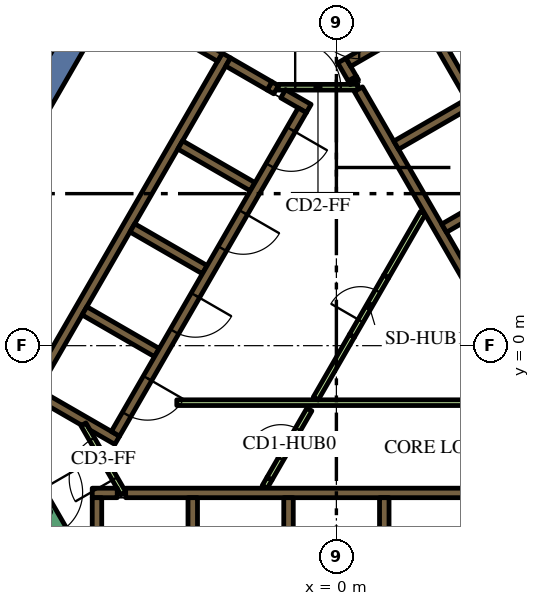
"""IFC4 building model, lengths in metres.
Left out: names, types, materials, properties, quantities, classifications, styles, units other than length and angle.
Written with IfcOpenShell. Run it as: python <this file> out.ifc"""

import sys

from ifc_helpers import new_model, si_unit, direction, frame, frame_2d, origin, place, context, subcontext, project, spatial, polyline, rectangle, outline, extrude, element, fill, save


model = new_model("IFC4")
c1 = context("Model", 3, precision=1e-05, world=origin(), true_north=direction((0.0, 1.0)))
c2 = subcontext(c1, "Body", "Model", "MODEL_VIEW")
j1 = project(units=[si_unit("LENGTHUNIT", "METRE"), si_unit("PLANEANGLEUNIT", "RADIAN")], contexts=[c1])
p1 = place(None, origin())
s1 = spatial("IfcSite", under=j1, at=p1, CompositionType="ELEMENT")
p2 = place(p1, origin())
s2 = spatial("IfcBuilding", under=s1, at=p2, CompositionType="ELEMENT")
p3 = place(p2, frame((0.0, 0.0, 247.8)))
s3 = spatial("IfcBuildingStorey", under=s2, at=p3, CompositionType="ELEMENT", Elevation=247.8)
p4 = place(p3, frame((8.235, 5.736, 0.0), z_axis=(0.0, 0.0, 1.0), x_axis=(-0.499983401189, 0.8660349869, 0.0)))
e1 = element("IfcWall", 1, at=p4, inside=s3, PredefinedType="SOLIDWALL", context=c2, shape_type="SweptSolid", body=[
    extrude(rectangle(XDim=12.472, YDim=0.7, at=frame_2d((6.236, 0.0))), origin(), (0.0, 0.0, 1.0), 4.2),
])
p5 = place(p3, frame((-12.625, -1.867, 0.0), z_axis=(0.0, 0.0, 1.0), x_axis=(0.499996974394, 0.866027150612, 0.0)))
e2 = element("IfcWall", 2, at=p5, inside=s3, PredefinedType="SOLIDWALL", context=c2, shape_type="SweptSolid", body=[
    extrude(rectangle(XDim=15.858, YDim=0.7, at=frame_2d((7.929, 0.0))), origin(), (0.0, 0.0, 1.0), 4.2),
])
p6 = place(p3, frame((-5.545, -3.875, 0.0), z_axis=(0.0, 0.0, 1.0), x_axis=(1.0, 0.0, 0.0)))
e3 = element("IfcWall", 3, at=p6, inside=s3, PredefinedType="SOLIDWALL", context=c2, shape_type="SweptSolid", body=[
    extrude(rectangle(XDim=11.97, YDim=0.25, at=frame_2d((5.985, 0.0))), origin(), (0.0, 0.0, 1.0), 4.2),
])
p7 = place(p3, frame((-6.425, -3.875, 0.0), z_axis=(0.0, 0.0, 1.0), x_axis=(1.0, 0.0, 0.0)))
e4 = element("IfcWall", 4, at=p7, inside=s3, PredefinedType="SOLIDWALL", context=c2, shape_type="SweptSolid", body=[
    extrude(rectangle(XDim=0.658, YDim=0.25, at=frame_2d((0.329, 0.0))), origin(), (0.0, 0.0, 1.0), 4.2),
])
for number, where, z_axis, x_axis in (
    (5, (1.26, -4.0, 0.0), (0.0, 0.0, 1.0), (0.0, -1.0, 0.0)),
    (6, (-1.26, -4.0, 0.0), (0.0, 0.0, 1.0), (0.0, -1.0, 0.0)),
    (7, (-3.78, -4.0, 0.0), (0.0, 0.0, 1.0), (0.0, -1.0, 0.0)),
):
    element("IfcWall", number, at=place(p3, frame(where, z_axis=z_axis, x_axis=x_axis)), inside=s3, PredefinedType="SOLIDWALL", context=c2, shape_type="SweptSolid", body=[
        extrude(rectangle(XDim=2.2, YDim=0.25, at=frame_2d((1.1, 0.0))), origin(), (0.0, 0.0, 1.0), 4.2),
    ])
p8 = place(p3, frame((-6.3, -7.125, 0.0), z_axis=(0.0, 0.0, 1.0), x_axis=(0.0, 1.0, 0.0)))
e8 = element("IfcWall", 8, at=p8, inside=s3, PredefinedType="SOLIDWALL", context=c2, shape_type="SweptSolid", body=[
    extrude(rectangle(XDim=3.125, YDim=0.25, at=frame_2d((1.562, 0.0))), origin(), (0.0, 0.0, 1.0), 4.2),
])
p9 = place(p3, frame((0.473, 6.93, 0.0), z_axis=(0.0, 0.0, 1.0), x_axis=(-0.49972245349, 0.866185586049, 0.0)))
e9 = element("IfcWall", 9, at=p9, inside=s3, PredefinedType="SOLIDWALL", context=c2, shape_type="SweptSolid", body=[
    extrude(rectangle(XDim=0.11, YDim=0.25, at=frame_2d((0.055, 0.0))), origin(), (0.0, 0.0, 1.0), 4.2),
])
p10 = place(p3, frame((6.568, -3.627, 0.0), z_axis=(0.0, 0.0, 1.0), x_axis=(-0.499999455981, 0.866025717874, 0.0)))
e10 = element("IfcWall", 10, at=p10, inside=s3, PredefinedType="SOLIDWALL", context=c2, shape_type="SweptSolid", body=[
    extrude(rectangle(XDim=11.978, YDim=0.25, at=frame_2d((5.989, 0.0))), origin(), (0.0, 0.0, 1.0), 4.2),
])
p11 = place(p3, frame((0.417, 7.027, 0.0), z_axis=(0.0, 0.0, 1.0), x_axis=(-0.500210807569, 0.865903659763, 0.0)))
e11 = element("IfcWall", 11, at=p11, inside=s3, PredefinedType="SOLIDWALL", context=c2, shape_type="SweptSolid", body=[
    extrude(rectangle(XDim=0.548, YDim=0.25, at=frame_2d((0.274, 0.0))), origin(), (0.0, 0.0, 1.0), 4.2),
])
p12 = place(p3, frame((3.1, 9.064, 0.0), z_axis=(0.0, 0.0, 1.0), x_axis=(-0.866030133475, -0.499991807846, 0.0)))
e12 = element("IfcWall", 12, at=p12, inside=s3, PredefinedType="SOLIDWALL", context=c2, shape_type="SweptSolid", body=[
    extrude(rectangle(XDim=3.217, YDim=0.25, at=frame_2d((1.608, 0.0))), origin(), (0.0, 0.0, 1.0), 4.2),
])
p13 = place(p3, frame((1.574, 5.274, 0.0), z_axis=(0.0, 0.0, 1.0), x_axis=(0.866028486751, 0.499994660107, 0.0)))
e13 = element("IfcWall", 13, at=p13, inside=s3, PredefinedType="SOLIDWALL", context=c2, shape_type="SweptSolid", body=[
    extrude(rectangle(XDim=2.2, YDim=0.25, at=frame_2d((1.1, 0.0))), origin(), (0.0, 0.0, 1.0), 4.2),
])
p14 = place(p3, frame((2.834, 3.091, 0.0), z_axis=(0.0, 0.0, 1.0), x_axis=(0.866008176907, 0.50002983664, 0.0)))
e14 = element("IfcWall", 14, at=p14, inside=s3, PredefinedType="SOLIDWALL", context=c2, shape_type="SweptSolid", body=[
    extrude(rectangle(XDim=2.2, YDim=0.25, at=frame_2d((1.1, 0.0))), origin(), (0.0, 0.0, 1.0), 4.2),
])
p15 = place(p3, frame((-8.06, -1.311, 0.0), z_axis=(0.0, 0.0, 1.0), x_axis=(0.50000273126, 0.866023826885, 0.0)))
e15 = element("IfcWall", 15, at=p15, inside=s3, PredefinedType="SOLIDWALL", context=c2, shape_type="SweptSolid", body=[
    extrude(rectangle(XDim=10.33, YDim=0.25, at=frame_2d((5.165, 0.0))), origin(), (0.0, 0.0, 1.0), 4.2),
])
p16 = place(p3, frame((-1.758, 6.835, 0.0), z_axis=(0.0, 0.0, 1.0), x_axis=(0.865982457891, -0.500074377092, 0.0)))
e16 = element("IfcWall", 16, at=p16, inside=s3, PredefinedType="SOLIDWALL", context=c2, shape_type="SweptSolid", body=[
    extrude(rectangle(XDim=0.2, YDim=0.25, at=frame_2d((0.1, 0.0))), origin(), (0.0, 0.0, 1.0), 4.2),
])
p17 = place(p3, frame((-1.76, 6.836, 0.0), z_axis=(0.0, 0.0, 1.0), x_axis=(-0.865952863304, 0.500125622755, 0.0)))
e17 = element("IfcWall", 17, at=p17, inside=s3, PredefinedType="SOLIDWALL", context=c2, shape_type="SweptSolid", body=[
    extrude(rectangle(XDim=1.258, YDim=0.25, at=frame_2d((0.629, 0.0))), origin(), (0.0, 0.0, 1.0), 4.2),
])
p18 = place(p3, frame((-0.728, 6.24, 0.0), z_axis=(0.0, 0.0, 1.0), x_axis=(-0.865955664968, 0.500120771724, 0.0)))
e18 = element("IfcWall", 18, at=p18, inside=s3, PredefinedType="SOLIDWALL", context=c2, shape_type="SweptSolid", body=[
    extrude(rectangle(XDim=0.778, YDim=0.25, at=frame_2d((0.389, 0.0))), origin(), (0.0, 0.0, 1.0), 4.2),
])
for number, where, z_axis, x_axis in (
    (19, (-2.204, 4.182, 0.0), (0.0, 0.0, 1.0), (-0.866, 0.5, 0.0)),
    (20, (-5.369, 3.1, 0.0), (0.0, 0.0, 1.0), (0.866, -0.5, 0.0)),
    (21, (-4.724, -0.182, 0.0), (0.0, 0.0, 1.0), (-0.866, 0.5, 0.0)),
):
    element("IfcWall", number, at=place(p3, frame(where, z_axis=z_axis, x_axis=x_axis)), inside=s3, PredefinedType="SOLIDWALL", context=c2, shape_type="SweptSolid", body=[
        extrude(rectangle(XDim=2.2, YDim=0.25, at=frame_2d((1.1, 0.0))), origin(), (0.0, 0.0, 1.0), 4.2),
    ])
p19 = place(p3, origin())
e22 = element("IfcWall", 22, at=p19, inside=s3, PredefinedType="SOLIDWALL", context=c2, shape_type="SweptSolid", body=[
    extrude(outline(polyline([(-5.922, -2.257), (-5.922, -2.257), (-5.705, -2.382), (-5.83, -2.598), (-6.483, -2.221), (-6.591, -2.033), (-6.591, -2.033), (-6.7, -2.096), (-7.952, -1.373), (-7.827, -1.156), (-5.922, -2.257)])), origin(), (0.0, 0.0, 1.0), 4.2),
])
p20 = place(p3, frame((-3.066, 7.59, 0.0), z_axis=(0.0, 0.0, 1.0), x_axis=(-0.866081358704, 0.49990307071, 0.0)))
e23 = element("IfcWall", 23, at=p20, inside=s3, PredefinedType="SOLIDWALL", context=c2, shape_type="SweptSolid", body=[
    extrude(rectangle(XDim=0.858, YDim=0.25, at=frame_2d((0.429, 0.0))), origin(), (0.0, 0.0, 1.0), 4.2),
])
p21 = place(p3, frame((-4.2, -1.5, 0.0), z_axis=(0.0, 0.0, 1.0), x_axis=(1.0, 0.0, 0.0)))
e24 = element("IfcWall", 24, at=p21, inside=s3, PredefinedType="PARTITIONING", context=c2, shape_type="SweptSolid", body=[
    extrude(rectangle(XDim=9.359, YDim=0.15, at=frame_2d((4.68, 0.0))), origin(), (0.0, 0.0, 1.0), 3.45),
])
p22 = place(p3, frame((-0.544, -1.393, 0.0), z_axis=(0.0, 0.0, 1.0), x_axis=(0.499928740635, 0.866066541489, 0.0)))
e25 = element("IfcWall", 25, at=p22, inside=s3, PredefinedType="PARTITIONING", context=c2, shape_type="SweptSolid", body=[
    extrude(rectangle(XDim=1.912, YDim=0.15, at=frame_2d((0.956, 0.0))), origin(), (0.0, 0.0, 1.0), 3.45),
])
p23 = place(p3, frame((1.312, 1.822, 0.0), z_axis=(0.0, 0.0, 1.0), x_axis=(0.500003549559, 0.866023354436, 0.0)))
e26 = element("IfcWall", 26, at=p23, inside=s3, PredefinedType="PARTITIONING", context=c2, shape_type="SweptSolid", body=[
    extrude(rectangle(XDim=1.93, YDim=0.15, at=frame_2d((0.965, 0.0))), origin(), (0.0, 0.0, 1.0), 3.45),
])
p24 = place(p3, frame((-1.887, -3.718, 0.0), z_axis=(0.0, 0.0, 1.0), x_axis=(0.500165633897, 0.865929753888, 0.0)))
e27 = element("IfcWall", 27, at=p24, inside=s3, PredefinedType="PARTITIONING", context=c2, shape_type="SweptSolid", body=[
    extrude(rectangle(XDim=0.254, YDim=0.15, at=frame_2d((0.127, 0.0))), origin(), (0.0, 0.0, 1.0), 3.45),
])
p25 = place(p3, frame((8.565, -2.185, 0.0), z_axis=(0.0, 0.0, 1.0), x_axis=(-0.499997954832, 0.866026584559, 0.0)))
e28 = element("IfcWall", 28, at=p25, inside=s3, PredefinedType="SOLIDWALL", context=c2, shape_type="SweptSolid", body=[
    extrude(rectangle(XDim=12.35, YDim=0.25, at=frame_2d((6.175, 0.0))), origin(), (0.0, 0.0, 1.0), 4.2),
])
p26 = place(p25, frame((0.585, 0.0, 0.0)))
e29 = element("IfcOpeningElement", 29, at=p26, cuts=e28, PredefinedType="OPENING", context=c2, shape_type="SweptSolid", body=[
    extrude(rectangle(XDim=1.1, YDim=2.1, at=frame_2d((0.55, 1.05))), frame((0.0, 0.135, 0.0), z_axis=(0.0, -1.0, 0.0), x_axis=(1.0, 0.0, 0.0)), (0.0, 0.0, 1.0), 0.27),
])
p27 = place(p3, frame((-0.898, 6.194, 0.0), z_axis=(0.0, 0.0, 1.0), x_axis=(-0.499996202215, -0.866027596426, 0.0)))
e30 = element("IfcWall", 30, at=p27, inside=s3, PredefinedType="SOLIDWALL", context=c2, shape_type="SweptSolid", body=[
    extrude(rectangle(XDim=9.83, YDim=0.25, at=frame_2d((4.915, 0.0))), origin(), (0.0, 0.0, 1.0), 4.2),
])
p28 = place(p27, frame((0.585, 0.0, 0.0)))
e31 = element("IfcOpeningElement", 31, at=p28, cuts=e30, PredefinedType="OPENING", context=c2, shape_type="SweptSolid", body=[
    extrude(rectangle(XDim=1.1, YDim=2.1, at=frame_2d((0.55, 1.05))), frame((0.0, 0.135, 0.0), z_axis=(0.0, -1.0, 0.0), x_axis=(1.0, 0.0, 0.0)), (0.0, 0.0, 1.0), 0.27),
])
p29 = place(p27, frame((3.105, 0.0, 0.0)))
e32 = element("IfcOpeningElement", 32, at=p29, cuts=e30, PredefinedType="OPENING", context=c2, shape_type="SweptSolid", body=[
    extrude(rectangle(XDim=1.1, YDim=2.1, at=frame_2d((0.55, 1.05))), frame((0.0, 0.135, 0.0), z_axis=(0.0, -1.0, 0.0), x_axis=(1.0, 0.0, 0.0)), (0.0, 0.0, 1.0), 0.27),
])
p30 = place(p27, frame((5.625, 0.0, 0.0)))
e33 = element("IfcOpeningElement", 33, at=p30, cuts=e30, PredefinedType="OPENING", context=c2, shape_type="SweptSolid", body=[
    extrude(rectangle(XDim=1.1, YDim=2.1, at=frame_2d((0.55, 1.05))), frame((0.0, 0.135, 0.0), z_axis=(0.0, -1.0, 0.0), x_axis=(1.0, 0.0, 0.0)), (0.0, 0.0, 1.0), 0.27),
])
p31 = place(p27, frame((8.145, 0.0, 0.0)))
e34 = element("IfcOpeningElement", 34, at=p31, cuts=e30, PredefinedType="OPENING", context=c2, shape_type="SweptSolid", body=[
    extrude(rectangle(XDim=1.1, YDim=2.1, at=frame_2d((0.55, 1.05))), frame((0.0, 0.135, 0.0), z_axis=(0.0, -1.0, 0.0), x_axis=(1.0, 0.0, 0.0)), (0.0, 0.0, 1.0), 0.27),
])
p32 = place(p3, frame((-8.103, -3.466, 0.0), z_axis=(0.0, 0.0, 1.0), x_axis=(0.500078061341, -0.865980330357, 0.0)))
e35 = element("IfcWall", 35, at=p32, inside=s3, PredefinedType="SOLIDWALL", context=c2, shape_type="SweptSolid", body=[
    extrude(rectangle(XDim=2.1, YDim=0.4, at=frame_2d((1.05, 0.0))), origin(), (0.0, 0.0, 1.0), 4.2),
])
p33 = place(p32, frame((0.45, 0.0, 0.0)))
e36 = element("IfcOpeningElement", 36, at=p33, cuts=e35, PredefinedType="OPENING", context=c2, shape_type="SweptSolid", body=[
    extrude(rectangle(XDim=1.2, YDim=2.1, at=frame_2d((0.6, 1.05))), frame((0.0, 0.21, 0.0), z_axis=(0.0, -1.0, 0.0), x_axis=(1.0, 0.0, 0.0)), (0.0, 0.0, 1.0), 0.42),
])
p34 = place(p3, frame((-1.76, -3.498, 0.0), z_axis=(0.0, 0.0, 1.0), x_axis=(0.499977374825, 0.866038466041, 0.0)))
e37 = element("IfcWall", 37, at=p34, inside=s3, PredefinedType="PARTITIONING", context=c2, shape_type="SweptSolid", body=[
    extrude(rectangle(XDim=2.1, YDim=0.15, at=frame_2d((1.05, 0.0))), origin(), (0.0, 0.0, 1.0), 3.45),
])
p35 = place(p34, frame((0.6, 0.0, 0.0)))
e38 = element("IfcOpeningElement", 38, at=p35, cuts=e37, PredefinedType="OPENING", context=c2, shape_type="SweptSolid", body=[
    extrude(rectangle(XDim=0.9, YDim=2.1, at=frame_2d((0.45, 1.05))), frame((0.0, 0.085, 0.0), z_axis=(0.0, -1.0, 0.0), x_axis=(1.0, 0.0, 0.0)), (0.0, 0.0, 1.0), 0.17),
])
p36 = place(p3, frame((-1.534, 6.8, 0.0), z_axis=(0.0, 0.0, 1.0), x_axis=(1.0, 0.0, 0.0)))
e39 = element("IfcWall", 39, at=p36, inside=s3, PredefinedType="PARTITIONING", context=c2, shape_type="SweptSolid", body=[
    extrude(rectangle(XDim=2.1, YDim=0.15, at=frame_2d((1.05, 0.0))), origin(), (0.0, 0.0, 1.0), 3.45),
])
p37 = place(p36, frame((0.45, 0.0, 0.0)))
e40 = element("IfcOpeningElement", 40, at=p37, cuts=e39, PredefinedType="OPENING", context=c2, shape_type="SweptSolid", body=[
    extrude(rectangle(XDim=1.2, YDim=2.1, at=frame_2d((0.6, 1.05))), frame((0.0, 0.085, 0.0), z_axis=(0.0, -1.0, 0.0), x_axis=(1.0, 0.0, 0.0)), (0.0, 0.0, 1.0), 0.17),
])
p38 = place(p3, frame((-5.606, -3.89, 0.0), z_axis=(0.0, 0.0, 1.0), x_axis=(-0.500027713859, 0.866009402589, 0.0)))
e41 = element("IfcWall", 41, at=p38, inside=s3, PredefinedType="PARTITIONING", context=c2, shape_type="SweptSolid", body=[
    extrude(rectangle(XDim=2.1, YDim=0.15, at=frame_2d((1.05, 0.0))), origin(), (0.0, 0.0, 1.0), 3.45),
])
p39 = place(p38, frame((0.45, 0.0, 0.0)))
e42 = element("IfcOpeningElement", 42, at=p39, cuts=e41, PredefinedType="OPENING", context=c2, shape_type="SweptSolid", body=[
    extrude(rectangle(XDim=1.2, YDim=2.1, at=frame_2d((0.6, 1.05))), frame((0.0, 0.085, 0.0), z_axis=(0.0, -1.0, 0.0), x_axis=(1.0, 0.0, 0.0)), (0.0, 0.0, 1.0), 0.17),
])
p40 = place(p3, frame((0.412, 0.263, 0.0), z_axis=(0.0, 0.0, 1.0), x_axis=(0.500062916607, 0.865989075817, 0.0)))
e43 = element("IfcWall", 43, at=p40, inside=s3, PredefinedType="PARTITIONING", context=c2, shape_type="SweptSolid", body=[
    extrude(rectangle(XDim=1.8, YDim=0.15, at=frame_2d((0.9, 0.0))), origin(), (0.0, 0.0, 1.0), 3.45),
])
p41 = place(p40, frame((0.45, 0.0, 0.0)))
e44 = element("IfcOpeningElement", 44, at=p41, cuts=e43, PredefinedType="OPENING", context=c2, shape_type="SweptSolid", body=[
    extrude(rectangle(XDim=0.9, YDim=2.1, at=frame_2d((0.45, 1.05))), frame((0.0, 0.085, 0.0), z_axis=(0.0, -1.0, 0.0), x_axis=(1.0, 0.0, 0.0)), (0.0, 0.0, 1.0), 0.17),
])
p42 = place(p3, frame((-7.364, 11.545, 0.0), z_axis=(0.0, 0.0, 1.0), x_axis=(-0.500001759768, -0.86602438778, 0.0)))
e45 = element("IfcWall", 45, at=p42, inside=s3, PredefinedType="PARTITIONING", context=c2, shape_type="SweptSolid", body=[
    extrude(rectangle(XDim=13.317, YDim=0.2, at=frame_2d((6.658, 0.0))), origin(), (0.0, 0.0, 1.0), 3.45),
])
p43 = place(p42, frame((6.2, 0.0, 0.0)))
e46 = element("IfcOpeningElement", 46, at=p43, cuts=e45, PredefinedType="OPENING", context=c2, shape_type="SweptSolid", body=[
    extrude(rectangle(XDim=1.0, YDim=2.1, at=frame_2d((0.5, 1.05))), frame((0.0, 0.11, 0.0), z_axis=(0.0, -1.0, 0.0), x_axis=(1.0, 0.0, 0.0)), (0.0, 0.0, 1.0), 0.22),
])
p44 = place(p28, origin())
e47 = element("IfcDoor", 47, at=p44, inside=s3, OperationType="DOUBLE_DOOR_SLIDING", PredefinedType="DOOR", context=c2, shape_type="SweptSolid", body=[
    extrude(rectangle(XDim=1.1, YDim=2.1, at=frame_2d((0.55, 1.05))), frame((0.0, 0.025, 0.0), z_axis=(0.0, -1.0, 0.0), x_axis=(1.0, 0.0, 0.0)), (0.0, 0.0, 1.0), 0.05),
])
fill(e31, e47)
p45 = place(p29, origin())
e48 = element("IfcDoor", 48, at=p45, inside=s3, OperationType="DOUBLE_DOOR_SLIDING", PredefinedType="DOOR", context=c2, shape_type="SweptSolid", body=[
    extrude(rectangle(XDim=1.1, YDim=2.1, at=frame_2d((0.55, 1.05))), frame((0.0, 0.025, 0.0), z_axis=(0.0, -1.0, 0.0), x_axis=(1.0, 0.0, 0.0)), (0.0, 0.0, 1.0), 0.05),
])
fill(e32, e48)
p46 = place(p30, origin())
e49 = element("IfcDoor", 49, at=p46, inside=s3, OperationType="DOUBLE_DOOR_SLIDING", PredefinedType="DOOR", context=c2, shape_type="SweptSolid", body=[
    extrude(rectangle(XDim=1.1, YDim=2.1, at=frame_2d((0.55, 1.05))), frame((0.0, 0.025, 0.0), z_axis=(0.0, -1.0, 0.0), x_axis=(1.0, 0.0, 0.0)), (0.0, 0.0, 1.0), 0.05),
])
fill(e33, e49)
p47 = place(p31, origin())
e50 = element("IfcDoor", 50, at=p47, inside=s3, OperationType="DOUBLE_DOOR_SLIDING", PredefinedType="DOOR", context=c2, shape_type="SweptSolid", body=[
    extrude(rectangle(XDim=1.1, YDim=2.1, at=frame_2d((0.55, 1.05))), frame((0.0, 0.025, 0.0), z_axis=(0.0, -1.0, 0.0), x_axis=(1.0, 0.0, 0.0)), (0.0, 0.0, 1.0), 0.05),
])
fill(e34, e50)
p48 = place(p33, origin())
e51 = element("IfcDoor", 51, at=p48, inside=s3, OperationType="SINGLE_SWING_LEFT", PredefinedType="DOOR", context=c2, shape_type="SweptSolid", body=[
    extrude(rectangle(XDim=1.2, YDim=2.1, at=frame_2d((0.6, 1.05))), frame((0.0, 0.025, 0.0), z_axis=(0.0, -1.0, 0.0), x_axis=(1.0, 0.0, 0.0)), (0.0, 0.0, 1.0), 0.05),
])
fill(e36, e51)
p49 = place(p35, origin())
e52 = element("IfcDoor", 52, at=p49, inside=s3, OperationType="SINGLE_SWING_LEFT", PredefinedType="DOOR", context=c2, shape_type="SweptSolid", body=[
    extrude(rectangle(XDim=0.9, YDim=2.1, at=frame_2d((0.45, 1.05))), frame((0.0, 0.025, 0.0), z_axis=(0.0, -1.0, 0.0), x_axis=(1.0, 0.0, 0.0)), (0.0, 0.0, 1.0), 0.05),
])
fill(e38, e52)
p50 = place(p37, origin())
e53 = element("IfcDoor", 53, at=p50, inside=s3, OperationType="SINGLE_SWING_LEFT", PredefinedType="DOOR", context=c2, shape_type="SweptSolid", body=[
    extrude(rectangle(XDim=1.2, YDim=2.1, at=frame_2d((0.6, 1.05))), frame((0.0, 0.025, 0.0), z_axis=(0.0, -1.0, 0.0), x_axis=(1.0, 0.0, 0.0)), (0.0, 0.0, 1.0), 0.05),
])
fill(e40, e53)
p51 = place(p39, origin())
e54 = element("IfcDoor", 54, at=p51, inside=s3, OperationType="SINGLE_SWING_LEFT", PredefinedType="DOOR", context=c2, shape_type="SweptSolid", body=[
    extrude(rectangle(XDim=1.2, YDim=2.1, at=frame_2d((0.6, 1.05))), frame((0.0, 0.025, 0.0), z_axis=(0.0, -1.0, 0.0), x_axis=(1.0, 0.0, 0.0)), (0.0, 0.0, 1.0), 0.05),
])
fill(e42, e54)
p52 = place(p41, origin())
e55 = element("IfcDoor", 55, at=p52, inside=s3, OperationType="SINGLE_SWING_LEFT", PredefinedType="DOOR", context=c2, shape_type="SweptSolid", body=[
    extrude(rectangle(XDim=0.9, YDim=2.1, at=frame_2d((0.45, 1.05))), frame((0.0, 0.025, 0.0), z_axis=(0.0, -1.0, 0.0), x_axis=(1.0, 0.0, 0.0)), (0.0, 0.0, 1.0), 0.05),
])
fill(e44, e55)
save(model, sys.argv[1])
